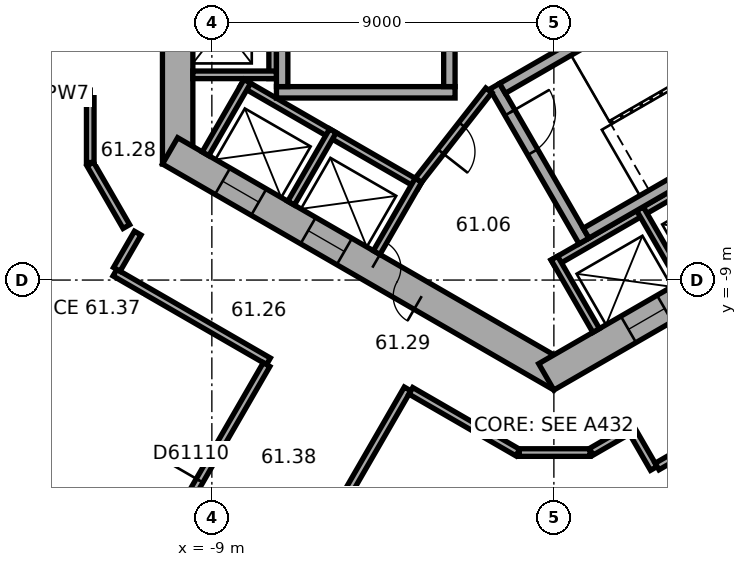
"""IFC4 building model, lengths in metres.
Left out: names, types, materials, properties, quantities, classifications, styles, units other than length and angle.
Written with IfcOpenShell. Run it as: python <this file> out.ifc"""

import sys

from ifc_helpers import new_model, si_unit, direction, frame, frame_2d, origin, place, context, subcontext, project, spatial, rectangle, extrude, element, fill, save


model = new_model("IFC4")
c1 = context("Model", 3, precision=1e-05, world=origin(), true_north=direction((0.0, 1.0)))
c2 = subcontext(c1, "Body", "Model", "MODEL_VIEW")
j1 = project(units=[si_unit("LENGTHUNIT", "METRE"), si_unit("PLANEANGLEUNIT", "RADIAN")], contexts=[c1])
p1 = place(None, origin())
s1 = spatial("IfcSite", under=j1, at=p1, CompositionType="ELEMENT")
p2 = place(p1, origin())
s2 = spatial("IfcBuilding", under=s1, at=p2, CompositionType="ELEMENT")
p3 = place(p2, frame((0.0, 0.0, 247.6)))
s3 = spatial("IfcBuildingStorey", under=s2, at=p3, CompositionType="ELEMENT", Elevation=247.6)
p4 = place(p3, frame((-9.9, 5.947, 0.0), z_axis=(0.0, 0.0, 1.0), x_axis=(0.0, -1.0, 0.0)))
e1 = element("IfcWall", 1, at=p4, inside=s3, PredefinedType="SHEAR", context=c2, shape_type="SweptSolid", body=[
    extrude(rectangle(XDim=11.894, YDim=0.8, at=frame_2d((5.947, 0.0))), origin(), (0.0, 0.0, 1.0), 3.7),
])
p5 = place(p4, frame((5.097, 0.0, 0.0)))
e2 = element("IfcOpeningElement", 2, at=p5, cuts=e1, PredefinedType="OPENING", context=c2, shape_type="SweptSolid", body=[
    extrude(rectangle(XDim=1.1, YDim=2.1, at=frame_2d((0.55, 1.05))), frame((0.0, 0.41, 0.0), z_axis=(0.0, -1.0, 0.0), x_axis=(1.0, 0.0, 0.0)), (0.0, 0.0, 1.0), 0.82),
])
p6 = place(p4, frame((7.697, 0.0, 0.0)))
e3 = element("IfcOpeningElement", 3, at=p6, cuts=e1, PredefinedType="OPENING", context=c2, shape_type="SweptSolid", body=[
    extrude(rectangle(XDim=1.1, YDim=2.1, at=frame_2d((0.55, 1.05))), frame((0.0, 0.41, 0.0), z_axis=(0.0, -1.0, 0.0), x_axis=(1.0, 0.0, 0.0)), (0.0, 0.0, 1.0), 0.82),
])
p7 = place(p3, frame((-10.1, -5.6, 0.0), z_axis=(0.0, 0.0, 1.0), x_axis=(0.866023897231, -0.500002609418, 0.0)))
e4 = element("IfcWall", 4, at=p7, inside=s3, PredefinedType="SHEAR", context=c2, shape_type="SweptSolid", body=[
    extrude(rectangle(XDim=11.894, YDim=0.8, at=frame_2d((5.947, 0.0))), origin(), (0.0, 0.0, 1.0), 3.7),
])
p8 = place(p7, frame((6.147, 0.0, 0.0)))
e5 = element("IfcOpeningElement", 5, at=p8, cuts=e4, PredefinedType="OPENING", context=c2, shape_type="SweptSolid", body=[
    extrude(rectangle(XDim=1.5, YDim=2.1, at=frame_2d((0.75, 1.05))), frame((0.0, 0.41, 0.0), z_axis=(0.0, -1.0, 0.0), x_axis=(1.0, 0.0, 0.0)), (0.0, 0.0, 1.0), 0.82),
])
p9 = place(p7, frame((1.597, 0.0, 0.0)))
e6 = element("IfcOpeningElement", 6, at=p9, cuts=e4, PredefinedType="OPENING", context=c2, shape_type="SweptSolid", body=[
    extrude(rectangle(XDim=1.1, YDim=2.1, at=frame_2d((0.55, 1.05))), frame((0.0, 0.41, 0.0), z_axis=(0.0, -1.0, 0.0), x_axis=(1.0, 0.0, 0.0)), (0.0, 0.0, 1.0), 0.82),
])
p10 = place(p7, frame((4.197, 0.0, 0.0)))
e7 = element("IfcOpeningElement", 7, at=p10, cuts=e4, PredefinedType="OPENING", context=c2, shape_type="SweptSolid", body=[
    extrude(rectangle(XDim=1.1, YDim=2.1, at=frame_2d((0.55, 1.05))), frame((0.0, 0.41, 0.0), z_axis=(0.0, -1.0, 0.0), x_axis=(1.0, 0.0, 0.0)), (0.0, 0.0, 1.0), 0.82),
])
p11 = place(p3, frame((-0.2, -11.547, 0.0), z_axis=(0.0, 0.0, 1.0), x_axis=(0.866023897231, 0.500002609418, 0.0)))
e8 = element("IfcWall", 8, at=p11, inside=s3, PredefinedType="SHEAR", context=c2, shape_type="SweptSolid", body=[
    extrude(rectangle(XDim=11.894, YDim=0.8, at=frame_2d((5.947, 0.0))), origin(), (0.0, 0.0, 1.0), 3.7),
])
p12 = place(p11, frame((2.497, 0.0, 0.0)))
e9 = element("IfcOpeningElement", 9, at=p12, cuts=e8, PredefinedType="OPENING", context=c2, shape_type="SweptSolid", body=[
    extrude(rectangle(XDim=1.1, YDim=2.1, at=frame_2d((0.55, 1.05))), frame((0.0, 0.41, 0.0), z_axis=(0.0, -1.0, 0.0), x_axis=(1.0, 0.0, 0.0)), (0.0, 0.0, 1.0), 0.82),
])
p13 = place(p11, frame((5.097, 0.0, 0.0)))
e10 = element("IfcOpeningElement", 10, at=p13, cuts=e8, PredefinedType="OPENING", context=c2, shape_type="SweptSolid", body=[
    extrude(rectangle(XDim=1.1, YDim=2.1, at=frame_2d((0.55, 1.05))), frame((0.0, 0.41, 0.0), z_axis=(0.0, -1.0, 0.0), x_axis=(1.0, 0.0, 0.0)), (0.0, 0.0, 1.0), 0.82),
])
p14 = place(p11, frame((7.697, 0.0, 0.0)))
e11 = element("IfcOpeningElement", 11, at=p14, cuts=e8, PredefinedType="OPENING", context=c2, shape_type="SweptSolid", body=[
    extrude(rectangle(XDim=1.1, YDim=2.1, at=frame_2d((0.55, 1.05))), frame((0.0, 0.41, 0.0), z_axis=(0.0, -1.0, 0.0), x_axis=(1.0, 0.0, 0.0)), (0.0, 0.0, 1.0), 0.82),
])
p15 = place(p3, frame((-17.664, -13.415, 0.0), z_axis=(0.0, 0.0, 1.0), x_axis=(0.866026555358, -0.49999800541, 0.0)))
e12 = element("IfcWall", 12, at=p15, inside=s3, PredefinedType="STANDARD", context=c2, shape_type="SweptSolid", body=[
    extrude(rectangle(XDim=18.841, YDim=0.2, at=frame_2d((9.421, 0.0))), origin(), (0.0, 0.0, 1.0), 3.7),
])
p16 = place(p15, frame((1.254, 0.0, 0.9)))
e13 = element("IfcOpeningElement", 13, at=p16, cuts=e12, PredefinedType="OPENING", context=c2, shape_type="SweptSolid", body=[
    extrude(rectangle(XDim=2.2, YDim=2.0, at=frame_2d((1.1, 1.0))), frame((0.0, 0.11, 0.0), z_axis=(0.0, -1.0, 0.0), x_axis=(1.0, 0.0, 0.0)), (0.0, 0.0, 1.0), 0.22),
])
p17 = place(p15, frame((4.788, 0.0, 0.9)))
e14 = element("IfcOpeningElement", 14, at=p17, cuts=e12, PredefinedType="OPENING", context=c2, shape_type="SweptSolid", body=[
    extrude(rectangle(XDim=2.2, YDim=2.0, at=frame_2d((1.1, 1.0))), frame((0.0, 0.11, 0.0), z_axis=(0.0, -1.0, 0.0), x_axis=(1.0, 0.0, 0.0)), (0.0, 0.0, 1.0), 0.22),
])
p18 = place(p15, frame((8.322, 0.0, 0.9)))
e15 = element("IfcOpeningElement", 15, at=p18, cuts=e12, PredefinedType="OPENING", context=c2, shape_type="SweptSolid", body=[
    extrude(rectangle(XDim=2.2, YDim=2.0, at=frame_2d((1.1, 1.0))), frame((0.0, 0.11, 0.0), z_axis=(0.0, -1.0, 0.0), x_axis=(1.0, 0.0, 0.0)), (0.0, 0.0, 1.0), 0.22),
])
p19 = place(p15, frame((11.855, 0.0, 0.9)))
e16 = element("IfcOpeningElement", 16, at=p19, cuts=e12, PredefinedType="OPENING", context=c2, shape_type="SweptSolid", body=[
    extrude(rectangle(XDim=2.2, YDim=2.0, at=frame_2d((1.1, 1.0))), frame((0.0, 0.11, 0.0), z_axis=(0.0, -1.0, 0.0), x_axis=(1.0, 0.0, 0.0)), (0.0, 0.0, 1.0), 0.22),
])
p20 = place(p15, frame((15.389, 0.0, 0.9)))
e17 = element("IfcOpeningElement", 17, at=p20, cuts=e12, PredefinedType="OPENING", context=c2, shape_type="SweptSolid", body=[
    extrude(rectangle(XDim=2.2, YDim=2.0, at=frame_2d((1.1, 1.0))), frame((0.0, 0.11, 0.0), z_axis=(0.0, -1.0, 0.0), x_axis=(1.0, 0.0, 0.0)), (0.0, 0.0, 1.0), 0.22),
])
p21 = place(p3, frame((2.739, -22.711, 0.0), z_axis=(0.0, 0.0, 1.0), x_axis=(0.833885723098, 0.551937134838, 0.0)))
e18 = element("IfcWall", 18, at=p21, inside=s3, PredefinedType="STANDARD", context=c2, shape_type="SweptSolid", body=[
    extrude(rectangle(XDim=18.841, YDim=0.2, at=frame_2d((9.421, 0.0))), origin(), (0.0, 0.0, 1.0), 3.7),
])
p22 = place(p21, frame((1.252, 0.0, 0.9)))
e19 = element("IfcOpeningElement", 19, at=p22, cuts=e18, PredefinedType="OPENING", context=c2, shape_type="SweptSolid", body=[
    extrude(rectangle(XDim=2.2, YDim=2.0, at=frame_2d((1.1, 1.0))), frame((0.0, 0.11, 0.0), z_axis=(0.0, -1.0, 0.0), x_axis=(1.0, 0.0, 0.0)), (0.0, 0.0, 1.0), 0.22),
])
p23 = place(p21, frame((4.786, 0.0, 0.9)))
e20 = element("IfcOpeningElement", 20, at=p23, cuts=e18, PredefinedType="OPENING", context=c2, shape_type="SweptSolid", body=[
    extrude(rectangle(XDim=2.2, YDim=2.0, at=frame_2d((1.1, 1.0))), frame((0.0, 0.11, 0.0), z_axis=(0.0, -1.0, 0.0), x_axis=(1.0, 0.0, 0.0)), (0.0, 0.0, 1.0), 0.22),
])
p24 = place(p21, frame((8.32, 0.0, 0.9)))
e21 = element("IfcOpeningElement", 21, at=p24, cuts=e18, PredefinedType="OPENING", context=c2, shape_type="SweptSolid", body=[
    extrude(rectangle(XDim=2.2, YDim=2.0, at=frame_2d((1.1, 1.0))), frame((0.0, 0.11, 0.0), z_axis=(0.0, -1.0, 0.0), x_axis=(1.0, 0.0, 0.0)), (0.0, 0.0, 1.0), 0.22),
])
p25 = place(p21, frame((11.854, 0.0, 0.9)))
e22 = element("IfcOpeningElement", 22, at=p25, cuts=e18, PredefinedType="OPENING", context=c2, shape_type="SweptSolid", body=[
    extrude(rectangle(XDim=2.2, YDim=2.0, at=frame_2d((1.1, 1.0))), frame((0.0, 0.11, 0.0), z_axis=(0.0, -1.0, 0.0), x_axis=(1.0, 0.0, 0.0)), (0.0, 0.0, 1.0), 0.22),
])
p26 = place(p21, frame((15.387, 0.0, 0.9)))
e23 = element("IfcOpeningElement", 23, at=p26, cuts=e18, PredefinedType="OPENING", context=c2, shape_type="SweptSolid", body=[
    extrude(rectangle(XDim=2.2, YDim=2.0, at=frame_2d((1.1, 1.0))), frame((0.0, 0.11, 0.0), z_axis=(0.0, -1.0, 0.0), x_axis=(1.0, 0.0, 0.0)), (0.0, 0.0, 1.0), 0.22),
])
p27 = place(p3, frame((-7.4, 4.3, 0.0), z_axis=(0.0, 0.0, 1.0), x_axis=(0.0, -1.0, 0.0)))
e24 = element("IfcWall", 24, at=p27, inside=s3, PredefinedType="PARTITIONING", context=c2, shape_type="SweptSolid", body=[
    extrude(rectangle(XDim=8.0, YDim=0.2, at=frame_2d((4.0, 0.0))), origin(), (0.0, 0.0, 1.0), 3.42),
])
p28 = place(p3, frame((-7.3, -3.6, 0.0), z_axis=(0.0, 0.0, 1.0), x_axis=(-1.0, 0.0, 0.0)))
e25 = element("IfcWall", 25, at=p28, inside=s3, PredefinedType="PARTITIONING", context=c2, shape_type="SweptSolid", body=[
    extrude(rectangle(XDim=2.2, YDim=0.2, at=frame_2d((1.1, 0.0))), origin(), (0.0, 0.0, 1.0), 3.42),
])
p29 = place(p3, frame((-8.203, -3.809, 0.0), z_axis=(0.0, 0.0, 1.0), x_axis=(0.866028230842, -0.499995103361, 0.0)))
e26 = element("IfcWall", 26, at=p29, inside=s3, PredefinedType="PARTITIONING", context=c2, shape_type="SweptSolid", body=[
    extrude(rectangle(XDim=5.4, YDim=0.2, at=frame_2d((2.7, 0.0))), origin(), (0.0, 0.0, 1.0), 3.42),
])
for number, where, z_axis, x_axis in (
    (27, (-8.067, -3.772, 0.0), (0.0, 0.0, 1.0), (-0.5, -0.866, 0.0)),
    (28, (-5.815, -5.072, 0.0), (0.0, 0.0, 1.0), (-0.5, -0.866, 0.0)),
):
    element("IfcWall", number, at=place(p3, frame(where, z_axis=z_axis, x_axis=x_axis)), inside=s3, PredefinedType="PARTITIONING", context=c2, shape_type="SweptSolid", body=[
        extrude(rectangle(XDim=2.2, YDim=0.2, at=frame_2d((1.1, 0.0))), origin(), (0.0, 0.0, 1.0), 3.42),
    ])
p30 = place(p3, frame((-3.563, -6.372, 0.0), z_axis=(0.0, 0.0, 1.0), x_axis=(-0.499994660107, -0.866028486751, 0.0)))
e29 = element("IfcWall", 29, at=p30, inside=s3, PredefinedType="PARTITIONING", context=c2, shape_type="SweptSolid", body=[
    extrude(rectangle(XDim=2.2, YDim=0.2, at=frame_2d((1.1, 0.0))), origin(), (0.0, 0.0, 1.0), 3.42),
])
p31 = place(p3, frame((-0.024, -8.559, 0.0), z_axis=(0.0, 0.0, 1.0), x_axis=(0.866026010844, 0.49999894854, 0.0)))
e30 = element("IfcWall", 30, at=p31, inside=s3, PredefinedType="PARTITIONING", context=c2, shape_type="SweptSolid", body=[
    extrude(rectangle(XDim=8.0, YDim=0.2, at=frame_2d((4.0, 0.0))), origin(), (0.0, 0.0, 1.0), 3.42),
])
for number, where, z_axis, x_axis in (
    (31, (0.013, -8.422, 0.0), (0.0, 0.0, 1.0), (0.5, -0.866, 0.0)),
    (32, (2.264, -7.122, 0.0), (0.0, 0.0, 1.0), (0.5, -0.866, 0.0)),
):
    element("IfcWall", number, at=place(p3, frame(where, z_axis=z_axis, x_axis=x_axis)), inside=s3, PredefinedType="PARTITIONING", context=c2, shape_type="SweptSolid", body=[
        extrude(rectangle(XDim=2.2, YDim=0.2, at=frame_2d((1.1, 0.0))), origin(), (0.0, 0.0, 1.0), 3.42),
    ])
p32 = place(p3, frame((-2.6, -4.06, 0.0), z_axis=(0.0, 0.0, 1.0), x_axis=(-1.0, 0.0, 0.0)))
e33 = element("IfcWall", 33, at=p32, inside=s3, PredefinedType="SHEAR", context=c2, shape_type="SweptSolid", body=[
    extrude(rectangle(XDim=4.7, YDim=0.3, at=frame_2d((2.35, 0.0))), origin(), (0.0, 0.0, 1.0), 3.42),
])
for number, where, z_axis, x_axis in (
    (34, (-2.75, 3.15, 0.0), (0.0, 0.0, 1.0), (0.0, -1.0, 0.0)),
    (35, (-7.15, 3.15, 0.0), (0.0, 0.0, 1.0), (0.0, -1.0, 0.0)),
):
    element("IfcWall", number, at=place(p3, frame(where, z_axis=z_axis, x_axis=x_axis)), inside=s3, PredefinedType="SHEAR", context=c2, shape_type="SweptSolid", body=[
        extrude(rectangle(XDim=7.06, YDim=0.3, at=frame_2d((3.53, 0.0))), origin(), (0.0, 0.0, 1.0), 3.42),
    ])
p33 = place(p3, frame((-1.558, -3.902, 0.0), z_axis=(0.0, 0.0, 1.0), x_axis=(0.499977259774, -0.866038532462, 0.0)))
e36 = element("IfcWall", 36, at=p33, inside=s3, PredefinedType="SHEAR", context=c2, shape_type="SweptSolid", body=[
    extrude(rectangle(XDim=4.7, YDim=0.3, at=frame_2d((2.35, 0.0))), origin(), (0.0, 0.0, 1.0), 3.42),
])
p34 = place(p33, frame((0.8, 0.0, 0.0)))
e37 = element("IfcOpeningElement", 37, at=p34, cuts=e36, PredefinedType="OPENING", context=c2, shape_type="SweptSolid", body=[
    extrude(rectangle(XDim=1.2, YDim=2.1, at=frame_2d((0.6, 1.05))), frame((0.0, 0.16, 0.0), z_axis=(0.0, -1.0, 0.0), x_axis=(1.0, 0.0, 0.0)), (0.0, 0.0, 1.0), 0.32),
])
for number, where, z_axis, x_axis in (
    (38, (-1.353, -3.957, 0.0), (0.0, 0.0, 1.0), (0.866, 0.5, 0.0)),
    (39, (0.847, -7.767, 0.0), (0.0, 0.0, 1.0), (0.866, 0.5, 0.0)),
):
    element("IfcWall", number, at=place(p3, frame(where, z_axis=z_axis, x_axis=x_axis)), inside=s3, PredefinedType="SHEAR", context=c2, shape_type="SweptSolid", body=[
        extrude(rectangle(XDim=7.06, YDim=0.3, at=frame_2d((3.53, 0.0))), origin(), (0.0, 0.0, 1.0), 3.42),
    ])
p35 = place(p3, frame((-1.712, -4.008, 0.0), z_axis=(0.0, 0.0, 1.0), x_axis=(-0.616549420702, -0.787316208287, 0.0)))
e40 = element("IfcWall", 40, at=p35, inside=s3, PredefinedType="PARTITIONING", context=c2, shape_type="SweptSolid", body=[
    extrude(rectangle(XDim=3.002, YDim=0.2, at=frame_2d((1.501, 0.0))), origin(), (0.0, 0.0, 1.0), 3.42),
])
p36 = place(p35, frame((1.15, 0.0, 0.0)))
e41 = element("IfcOpeningElement", 41, at=p36, cuts=e40, PredefinedType="OPENING", context=c2, shape_type="SweptSolid", body=[
    extrude(rectangle(XDim=0.9, YDim=2.1, at=frame_2d((0.45, 1.05))), frame((0.0, 0.11, 0.0), z_axis=(0.0, -1.0, 0.0), x_axis=(1.0, 0.0, 0.0)), (0.0, 0.0, 1.0), 0.22),
])
p37 = place(p3, frame((-13.401, -4.101, 0.0), z_axis=(0.0, 0.0, 1.0), x_axis=(1.0, 0.0, 0.0)))
e42 = element("IfcWall", 42, at=p37, inside=s3, PredefinedType="PARTITIONING", context=c2, shape_type="SweptSolid", body=[
    extrude(rectangle(XDim=1.201, YDim=0.2, at=frame_2d((0.601, 0.0))), origin(), (0.0, 0.0, 1.0), 3.42),
])
p38 = place(p3, frame((-12.2, -5.947, 0.0), z_axis=(0.0, 0.0, 1.0), x_axis=(0.500022797313, -0.86601224135, 0.0)))
e43 = element("IfcWall", 43, at=p38, inside=s3, PredefinedType="PARTITIONING", context=c2, shape_type="SweptSolid", body=[
    extrude(rectangle(XDim=1.9, YDim=0.2, at=frame_2d((0.95, 0.0))), origin(), (0.0, 0.0, 1.0), 3.42),
])
p39 = place(p3, frame((-12.2, -4.201, 0.0), z_axis=(0.0, 0.0, 1.0), x_axis=(0.0, -1.0, 0.0)))
e44 = element("IfcWall", 44, at=p39, inside=s3, PredefinedType="PARTITIONING", context=c2, shape_type="SweptSolid", body=[
    extrude(rectangle(XDim=1.706, YDim=0.2, at=frame_2d((0.853, 0.0))), origin(), (0.0, 0.0, 1.0), 3.42),
])
p40 = place(p3, frame((-11.551, -8.805, 0.0), z_axis=(0.0, 0.0, 1.0), x_axis=(0.866038310922, -0.499977643516, 0.0)))
e45 = element("IfcWall", 45, at=p40, inside=s3, PredefinedType="PARTITIONING", context=c2, shape_type="SweptSolid", body=[
    extrude(rectangle(XDim=4.665, YDim=0.2, at=frame_2d((2.333, 0.0))), origin(), (0.0, 0.0, 1.0), 3.42),
])
p41 = place(p3, frame((-10.951, -7.765, 0.0), z_axis=(0.0, 0.0, 1.0), x_axis=(-0.499978356969, -0.866037899034, 0.0)))
e46 = element("IfcWall", 46, at=p41, inside=s3, PredefinedType="PARTITIONING", context=c2, shape_type="SweptSolid", body=[
    extrude(rectangle(XDim=1.101, YDim=0.2, at=frame_2d((0.551, 0.0))), origin(), (0.0, 0.0, 1.0), 3.42),
])
p42 = place(p3, frame((-10.585, -16.463, 0.0), z_axis=(0.0, 0.0, 1.0), x_axis=(0.499993802756, 0.866028981735, 0.0)))
e47 = element("IfcWall", 47, at=p42, inside=s3, PredefinedType="PARTITIONING", context=c2, shape_type="SweptSolid", body=[
    extrude(rectangle(XDim=6.049, YDim=0.2, at=frame_2d((3.024, 0.0))), origin(), (0.0, 0.0, 1.0), 2.87),
])
p43 = place(p42, frame((2.524, 0.0, 0.0)))
e48 = element("IfcOpeningElement", 48, at=p43, cuts=e47, PredefinedType="OPENING", context=c2, shape_type="SweptSolid", body=[
    extrude(rectangle(XDim=1.0, YDim=2.1, at=frame_2d((0.5, 1.05))), frame((0.0, 0.11, 0.0), z_axis=(0.0, -1.0, 0.0), x_axis=(1.0, 0.0, 0.0)), (0.0, 0.0, 1.0), 0.22),
])
p44 = place(p3, frame((-7.525, -18.23, 0.0), z_axis=(0.0, 0.0, 1.0), x_axis=(0.499983153418, 0.866035129944, 0.0)))
e49 = element("IfcWall", 49, at=p44, inside=s3, PredefinedType="PARTITIONING", context=c2, shape_type="SweptSolid", body=[
    extrude(rectangle(XDim=7.35, YDim=0.2, at=frame_2d((3.675, 0.0))), origin(), (0.0, 0.0, 1.0), 3.42),
])
p45 = place(p44, frame((3.175, 0.0, 0.0)))
e50 = element("IfcOpeningElement", 50, at=p45, cuts=e49, PredefinedType="OPENING", context=c2, shape_type="SweptSolid", body=[
    extrude(rectangle(XDim=1.0, YDim=2.1, at=frame_2d((0.5, 1.05))), frame((0.0, 0.11, 0.0), z_axis=(0.0, -1.0, 0.0), x_axis=(1.0, 0.0, 0.0)), (0.0, 0.0, 1.0), 0.22),
])
p46 = place(p3, frame((-3.763, -11.915, 0.0), z_axis=(0.0, 0.0, 1.0), x_axis=(0.866037915695, -0.499978328108, 0.0)))
e51 = element("IfcWall", 51, at=p46, inside=s3, PredefinedType="PARTITIONING", context=c2, shape_type="SweptSolid", body=[
    extrude(rectangle(XDim=3.249, YDim=0.2, at=frame_2d((1.625, 0.0))), origin(), (0.0, 0.0, 1.0), 3.42),
])
p47 = place(p3, frame((-0.91, -13.539, 0.0), z_axis=(0.0, 0.0, 1.0), x_axis=(1.0, 0.0, 0.0)))
e52 = element("IfcWall", 52, at=p47, inside=s3, PredefinedType="PARTITIONING", context=c2, shape_type="SweptSolid", body=[
    extrude(rectangle(XDim=1.86, YDim=0.2, at=frame_2d((0.93, 0.0))), origin(), (0.0, 0.0, 1.0), 3.42),
])
p48 = place(p3, frame((0.985, -13.519, 0.0), z_axis=(0.0, 0.0, 1.0), x_axis=(0.866054082991, 0.499950322867, 0.0)))
e53 = element("IfcWall", 53, at=p48, inside=s3, PredefinedType="PARTITIONING", context=c2, shape_type="SweptSolid", body=[
    extrude(rectangle(XDim=1.206, YDim=0.2, at=frame_2d((0.603, 0.0))), origin(), (0.0, 0.0, 1.0), 3.42),
])
p49 = place(p3, frame((2.079, -13.003, 0.0), z_axis=(0.0, 0.0, 1.0), x_axis=(0.500074377092, -0.865982457891, 0.0)))
e54 = element("IfcWall", 54, at=p49, inside=s3, PredefinedType="PARTITIONING", context=c2, shape_type="SweptSolid", body=[
    extrude(rectangle(XDim=1.101, YDim=0.2, at=frame_2d((0.55, 0.0))), origin(), (0.0, 0.0, 1.0), 3.42),
])
p50 = place(p3, frame((2.716, -13.906, 0.0), z_axis=(0.0, 0.0, 1.0), x_axis=(0.866048512801, 0.499959971872, 0.0)))
e55 = element("IfcWall", 55, at=p50, inside=s3, PredefinedType="PARTITIONING", context=c2, shape_type="SweptSolid", body=[
    extrude(rectangle(XDim=2.818, YDim=0.2, at=frame_2d((1.409, 0.0))), origin(), (0.0, 0.0, 1.0), 3.42),
])
p51 = place(p8, origin())
e56 = element("IfcDoor", 56, at=p51, inside=s3, OperationType="DOUBLE_DOOR_SINGLE_SWING", PredefinedType="DOOR", context=c2, shape_type="SweptSolid", body=[
    extrude(rectangle(XDim=1.5, YDim=2.1, at=frame_2d((0.75, 1.05))), frame((0.0, 0.025, 0.0), z_axis=(0.0, -1.0, 0.0), x_axis=(1.0, 0.0, 0.0)), (0.0, 0.0, 1.0), 0.05),
])
fill(e5, e56)
p52 = place(p34, origin())
e57 = element("IfcDoor", 57, at=p52, inside=s3, OperationType="SINGLE_SWING_RIGHT", PredefinedType="DOOR", context=c2, shape_type="SweptSolid", body=[
    extrude(rectangle(XDim=1.2, YDim=2.1, at=frame_2d((0.6, 1.05))), frame((0.0, 0.025, 0.0), z_axis=(0.0, -1.0, 0.0), x_axis=(1.0, 0.0, 0.0)), (0.0, 0.0, 1.0), 0.05),
])
fill(e37, e57)
p53 = place(p36, origin())
e58 = element("IfcDoor", 58, at=p53, inside=s3, OperationType="SINGLE_SWING_LEFT", PredefinedType="DOOR", context=c2, shape_type="SweptSolid", body=[
    extrude(rectangle(XDim=0.9, YDim=2.1, at=frame_2d((0.45, 1.05))), frame((0.0, 0.025, 0.0), z_axis=(0.0, -1.0, 0.0), x_axis=(1.0, 0.0, 0.0)), (0.0, 0.0, 1.0), 0.05),
])
fill(e41, e58)
p54 = place(p9, origin())
e59 = element("IfcDoor", 59, at=p54, inside=s3, OperationType="DOUBLE_DOOR_SLIDING", PredefinedType="DOOR", context=c2, shape_type="SweptSolid", body=[
    extrude(rectangle(XDim=1.1, YDim=2.1, at=frame_2d((0.55, 1.05))), frame((0.0, 0.025, 0.0), z_axis=(0.0, -1.0, 0.0), x_axis=(1.0, 0.0, 0.0)), (0.0, 0.0, 1.0), 0.05),
])
fill(e6, e59)
p55 = place(p10, origin())
e60 = element("IfcDoor", 60, at=p55, inside=s3, OperationType="DOUBLE_DOOR_SLIDING", PredefinedType="DOOR", context=c2, shape_type="SweptSolid", body=[
    extrude(rectangle(XDim=1.1, YDim=2.1, at=frame_2d((0.55, 1.05))), frame((0.0, 0.025, 0.0), z_axis=(0.0, -1.0, 0.0), x_axis=(1.0, 0.0, 0.0)), (0.0, 0.0, 1.0), 0.05),
])
fill(e7, e60)
p56 = place(p12, origin())
e61 = element("IfcDoor", 61, at=p56, inside=s3, OperationType="DOUBLE_DOOR_SLIDING", PredefinedType="DOOR", context=c2, shape_type="SweptSolid", body=[
    extrude(rectangle(XDim=1.1, YDim=2.1, at=frame_2d((0.55, 1.05))), frame((0.0, 0.025, 0.0), z_axis=(0.0, -1.0, 0.0), x_axis=(1.0, 0.0, 0.0)), (0.0, 0.0, 1.0), 0.05),
])
fill(e9, e61)
p57 = place(p43, origin())
e62 = element("IfcDoor", 62, at=p57, inside=s3, OperationType="SINGLE_SWING_LEFT", PredefinedType="DOOR", context=c2, shape_type="SweptSolid", body=[
    extrude(rectangle(XDim=1.0, YDim=2.1, at=frame_2d((0.5, 1.05))), frame((0.0, 0.025, 0.0), z_axis=(0.0, -1.0, 0.0), x_axis=(1.0, 0.0, 0.0)), (0.0, 0.0, 1.0), 0.05),
])
fill(e48, e62)
save(model, sys.argv[1])
